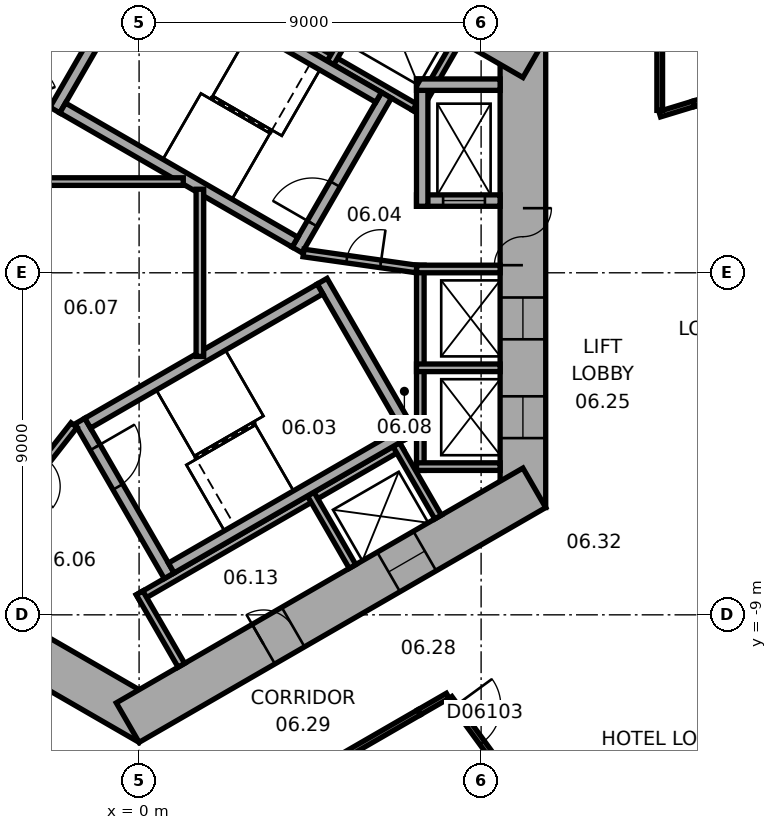
"""IFC4 building model, lengths in metres.
Left out: names, types, materials, properties, quantities, classifications, styles, units other than length and angle.
Written with IfcOpenShell. Run it as: python <this file> out.ifc"""

import sys

from ifc_helpers import new_model, si_unit, direction, frame, frame_2d, origin, place, context, subcontext, project, spatial, rectangle, extrude, element, fill, save


model = new_model("IFC4")
c1 = context("Model", 3, precision=1e-05, world=origin(), true_north=direction((0.0, 1.0)))
c2 = subcontext(c1, "Body", "Model", "MODEL_VIEW")
j1 = project(units=[si_unit("LENGTHUNIT", "METRE"), si_unit("PLANEANGLEUNIT", "RADIAN")], contexts=[c1])
p1 = place(None, origin())
s1 = spatial("IfcSite", under=j1, at=p1, CompositionType="ELEMENT")
p2 = place(p1, origin())
s2 = spatial("IfcBuilding", under=s1, at=p2, CompositionType="ELEMENT")
p3 = place(p2, frame((0.0, 0.0, 39.0)))
s3 = spatial("IfcBuildingStorey", under=s2, at=p3, CompositionType="ELEMENT", Elevation=39.0)
p4 = place(p3, frame((10.1, -6.177, 0.0), z_axis=(0.0, 0.0, 1.0), x_axis=(0.0, 1.0, 0.0)))
e1 = element("IfcWall", 1, at=p4, inside=s3, PredefinedType="SHEAR", context=c2, shape_type="SweptSolid", body=[
    extrude(rectangle(XDim=12.355, YDim=1.2, at=frame_2d((6.177, 0.0))), origin(), (0.0, 0.0, 1.0), 5.0),
])
p5 = place(p4, frame((6.378, 0.0, 0.0)))
e2 = element("IfcOpeningElement", 2, at=p5, cuts=e1, PredefinedType="OPENING", context=c2, shape_type="SweptSolid", body=[
    extrude(rectangle(XDim=1.5, YDim=2.1, at=frame_2d((0.75, 1.05))), frame((0.0, 0.61, 0.0), z_axis=(0.0, -1.0, 0.0), x_axis=(1.0, 0.0, 0.0)), (0.0, 0.0, 1.0), 1.22),
])
p6 = place(p4, frame((1.828, 0.0, 0.0)))
e3 = element("IfcOpeningElement", 3, at=p6, cuts=e1, PredefinedType="OPENING", context=c2, shape_type="SweptSolid", body=[
    extrude(rectangle(XDim=1.1, YDim=2.1, at=frame_2d((0.55, 1.05))), frame((0.0, 0.61, 0.0), z_axis=(0.0, -1.0, 0.0), x_axis=(1.0, 0.0, 0.0)), (0.0, 0.0, 1.0), 1.22),
])
p7 = place(p4, frame((4.427, 0.0, 0.0)))
e4 = element("IfcOpeningElement", 4, at=p7, cuts=e1, PredefinedType="OPENING", context=c2, shape_type="SweptSolid", body=[
    extrude(rectangle(XDim=1.1, YDim=2.1, at=frame_2d((0.55, 1.05))), frame((0.0, 0.61, 0.0), z_axis=(0.0, -1.0, 0.0), x_axis=(1.0, 0.0, 0.0)), (0.0, 0.0, 1.0), 1.22),
])
p8 = place(p3, frame((10.4, 5.658, 0.0), z_axis=(0.0, 0.0, 1.0), x_axis=(-0.866021384402, 0.500006961711, 0.0)))
e5 = element("IfcWall", 5, at=p8, inside=s3, PredefinedType="SHEAR", context=c2, shape_type="SweptSolid", body=[
    extrude(rectangle(XDim=12.355, YDim=1.2, at=frame_2d((6.178, 0.0))), origin(), (0.0, 0.0, 1.0), 5.0),
])
p9 = place(p8, frame((2.728, 0.0, 0.0)))
e6 = element("IfcOpeningElement", 6, at=p9, cuts=e5, PredefinedType="OPENING", context=c2, shape_type="SweptSolid", body=[
    extrude(rectangle(XDim=1.1, YDim=2.1, at=frame_2d((0.55, 1.05))), frame((0.0, 0.61, 0.0), z_axis=(0.0, -1.0, 0.0), x_axis=(1.0, 0.0, 0.0)), (0.0, 0.0, 1.0), 1.22),
])
p10 = place(p8, frame((5.328, 0.0, 0.0)))
e7 = element("IfcOpeningElement", 7, at=p10, cuts=e5, PredefinedType="OPENING", context=c2, shape_type="SweptSolid", body=[
    extrude(rectangle(XDim=1.1, YDim=2.1, at=frame_2d((0.55, 1.05))), frame((0.0, 0.61, 0.0), z_axis=(0.0, -1.0, 0.0), x_axis=(1.0, 0.0, 0.0)), (0.0, 0.0, 1.0), 1.22),
])
p11 = place(p8, frame((7.928, 0.0, 0.0)))
e8 = element("IfcOpeningElement", 8, at=p11, cuts=e5, PredefinedType="OPENING", context=c2, shape_type="SweptSolid", body=[
    extrude(rectangle(XDim=1.1, YDim=2.1, at=frame_2d((0.55, 1.05))), frame((0.0, 0.61, 0.0), z_axis=(0.0, -1.0, 0.0), x_axis=(1.0, 0.0, 0.0)), (0.0, 0.0, 1.0), 1.22),
])
p12 = place(p3, frame((0.3, 11.836, 0.0), z_axis=(0.0, 0.0, 1.0), x_axis=(-0.866021384402, -0.500006961711, 0.0)))
e9 = element("IfcWall", 9, at=p12, inside=s3, PredefinedType="SHEAR", context=c2, shape_type="SweptSolid", body=[
    extrude(rectangle(XDim=12.355, YDim=1.2, at=frame_2d((6.178, 0.0))), origin(), (0.0, 0.0, 1.0), 5.0),
])
p13 = place(p12, frame((6.378, 0.0, 0.0)))
e10 = element("IfcOpeningElement", 10, at=p13, cuts=e9, PredefinedType="OPENING", context=c2, shape_type="SweptSolid", body=[
    extrude(rectangle(XDim=1.5, YDim=2.1, at=frame_2d((0.75, 1.05))), frame((0.0, 0.61, 0.0), z_axis=(0.0, -1.0, 0.0), x_axis=(1.0, 0.0, 0.0)), (0.0, 0.0, 1.0), 1.22),
])
p14 = place(p12, frame((1.828, 0.0, 0.0)))
e11 = element("IfcOpeningElement", 11, at=p14, cuts=e9, PredefinedType="OPENING", context=c2, shape_type="SweptSolid", body=[
    extrude(rectangle(XDim=1.1, YDim=2.1, at=frame_2d((0.55, 1.05))), frame((0.0, 0.61, 0.0), z_axis=(0.0, -1.0, 0.0), x_axis=(1.0, 0.0, 0.0)), (0.0, 0.0, 1.0), 1.22),
])
p15 = place(p3, frame((-10.4, -5.658, 0.0), z_axis=(0.0, 0.0, 1.0), x_axis=(0.866021384402, -0.500006961711, 0.0)))
e12 = element("IfcWall", 12, at=p15, inside=s3, PredefinedType="SHEAR", context=c2, shape_type="SweptSolid", body=[
    extrude(rectangle(XDim=12.355, YDim=1.2, at=frame_2d((6.178, 0.0))), origin(), (0.0, 0.0, 1.0), 5.0),
])
p16 = place(p15, frame((6.378, 0.0, 0.0)))
e13 = element("IfcOpeningElement", 13, at=p16, cuts=e12, PredefinedType="OPENING", context=c2, shape_type="SweptSolid", body=[
    extrude(rectangle(XDim=1.5, YDim=2.1, at=frame_2d((0.75, 1.05))), frame((0.0, 0.61, 0.0), z_axis=(0.0, -1.0, 0.0), x_axis=(1.0, 0.0, 0.0)), (0.0, 0.0, 1.0), 1.22),
])
p17 = place(p15, frame((3.228, 0.0, 0.0)))
e14 = element("IfcOpeningElement", 14, at=p17, cuts=e12, PredefinedType="OPENING", context=c2, shape_type="SweptSolid", body=[
    extrude(rectangle(XDim=0.9, YDim=2.1, at=frame_2d((0.45, 1.05))), frame((0.0, 0.61, 0.0), z_axis=(0.0, -1.0, 0.0), x_axis=(1.0, 0.0, 0.0)), (0.0, 0.0, 1.0), 1.22),
])
p18 = place(p3, frame((-0.3, -11.836, 0.0), z_axis=(0.0, 0.0, 1.0), x_axis=(0.866021384402, 0.500006961711, 0.0)))
e15 = element("IfcWall", 15, at=p18, inside=s3, PredefinedType="SHEAR", context=c2, shape_type="SweptSolid", body=[
    extrude(rectangle(XDim=12.355, YDim=1.2, at=frame_2d((6.178, 0.0))), origin(), (0.0, 0.0, 1.0), 5.0),
])
p19 = place(p18, frame((4.128, 0.0, 0.0)))
e16 = element("IfcOpeningElement", 16, at=p19, cuts=e15, PredefinedType="OPENING", context=c2, shape_type="SweptSolid", body=[
    extrude(rectangle(XDim=0.9, YDim=2.1, at=frame_2d((0.45, 1.05))), frame((0.0, 0.61, 0.0), z_axis=(0.0, -1.0, 0.0), x_axis=(1.0, 0.0, 0.0)), (0.0, 0.0, 1.0), 1.22),
])
p20 = place(p18, frame((7.928, 0.0, 0.0)))
e17 = element("IfcOpeningElement", 17, at=p20, cuts=e15, PredefinedType="OPENING", context=c2, shape_type="SweptSolid", body=[
    extrude(rectangle(XDim=1.1, YDim=2.1, at=frame_2d((0.55, 1.05))), frame((0.0, 0.61, 0.0), z_axis=(0.0, -1.0, 0.0), x_axis=(1.0, 0.0, 0.0)), (0.0, 0.0, 1.0), 1.22),
])
p21 = place(p3, frame((7.4, -5.2, 0.0), z_axis=(0.0, 0.0, 1.0), x_axis=(0.0, 1.0, 0.0)))
e18 = element("IfcWall", 18, at=p21, inside=s3, PredefinedType="PARTITIONING", context=c2, shape_type="SweptSolid", body=[
    extrude(rectangle(XDim=5.4, YDim=0.2, at=frame_2d((2.7, 0.0))), origin(), (0.0, 0.0, 1.0), 4.75),
])
for number, where, z_axis, x_axis in (
    (19, (7.3, -5.1, 0.0), (0.0, 0.0, 1.0), (1.0, 0.0, 0.0)),
    (20, (7.3, -2.5, 0.0), (0.0, 0.0, 1.0), (1.0, 0.0, 0.0)),
    (21, (7.3, 0.1, 0.0), (0.0, 0.0, 1.0), (1.0, 0.0, 0.0)),
):
    element("IfcWall", number, at=place(p3, frame(where, z_axis=z_axis, x_axis=x_axis)), inside=s3, PredefinedType="PARTITIONING", context=c2, shape_type="SweptSolid", body=[
        extrude(rectangle(XDim=2.2, YDim=0.2, at=frame_2d((1.1, 0.0))), origin(), (0.0, 0.0, 1.0), 4.75),
    ])
p22 = place(p3, frame((7.424, 4.259, 0.0), z_axis=(0.0, 0.0, 1.0), x_axis=(-0.866026010844, 0.49999894854, 0.0)))
e22 = element("IfcWall", 22, at=p22, inside=s3, PredefinedType="PARTITIONING", context=c2, shape_type="SweptSolid", body=[
    extrude(rectangle(XDim=8.0, YDim=0.2, at=frame_2d((4.0, 0.0))), origin(), (0.0, 0.0, 1.0), 4.75),
])
for number, where, z_axis, x_axis in (
    (23, (7.287, 4.222, 0.0), (0.0, 0.0, 1.0), (0.5, 0.866, 0.0)),
    (24, (5.036, 5.522, 0.0), (0.0, 0.0, 1.0), (0.5, 0.866, 0.0)),
):
    element("IfcWall", number, at=place(p3, frame(where, z_axis=z_axis, x_axis=x_axis)), inside=s3, PredefinedType="PARTITIONING", context=c2, shape_type="SweptSolid", body=[
        extrude(rectangle(XDim=2.2, YDim=0.2, at=frame_2d((1.1, 0.0))), origin(), (0.0, 0.0, 1.0), 4.75),
    ])
p23 = place(p3, frame((-0.024, -8.559, 0.0), z_axis=(0.0, 0.0, 1.0), x_axis=(0.866026010844, 0.49999894854, 0.0)))
e25 = element("IfcWall", 25, at=p23, inside=s3, PredefinedType="PARTITIONING", context=c2, shape_type="SweptSolid", body=[
    extrude(rectangle(XDim=8.0, YDim=0.2, at=frame_2d((4.0, 0.0))), origin(), (0.0, 0.0, 1.0), 4.75),
])
for number, where, z_axis, x_axis in (
    (26, (0.013, -8.422, 0.0), (0.0, 0.0, 1.0), (0.5, -0.866, 0.0)),
    (27, (4.516, -5.822, 0.0), (0.0, 0.0, 1.0), (0.5, -0.866, 0.0)),
    (28, (6.768, -4.522, 0.0), (0.0, 0.0, 1.0), (0.5, -0.866, 0.0)),
):
    element("IfcWall", number, at=place(p3, frame(where, z_axis=z_axis, x_axis=x_axis)), inside=s3, PredefinedType="PARTITIONING", context=c2, shape_type="SweptSolid", body=[
        extrude(rectangle(XDim=2.2, YDim=0.2, at=frame_2d((1.1, 0.0))), origin(), (0.0, 0.0, 1.0), 4.75),
    ])
p24 = place(p3, frame((4.158, 0.602, 0.0), z_axis=(0.0, 0.0, 1.0), x_axis=(0.499977259774, 0.866038532462, 0.0)))
e29 = element("IfcWall", 29, at=p24, inside=s3, PredefinedType="SHEAR", context=c2, shape_type="SweptSolid", body=[
    extrude(rectangle(XDim=4.7, YDim=0.3, at=frame_2d((2.35, 0.0))), origin(), (0.0, 0.0, 1.0), 4.75),
])
p25 = place(p24, frame((0.8, 0.0, 0.0)))
e30 = element("IfcOpeningElement", 30, at=p25, cuts=e29, PredefinedType="OPENING", context=c2, shape_type="SweptSolid", body=[
    extrude(rectangle(XDim=1.2, YDim=2.1, at=frame_2d((0.6, 1.05))), frame((0.0, 0.16, 0.0), z_axis=(0.0, -1.0, 0.0), x_axis=(1.0, 0.0, 0.0)), (0.0, 0.0, 1.0), 0.32),
])
p26 = place(p3, frame((-2.216, 4.282, 0.0), z_axis=(0.0, 0.0, 1.0), x_axis=(0.499977259774, 0.866038532462, 0.0)))
e31 = element("IfcWall", 31, at=p26, inside=s3, PredefinedType="SHEAR", context=c2, shape_type="SweptSolid", body=[
    extrude(rectangle(XDim=4.7, YDim=0.3, at=frame_2d((2.35, 0.0))), origin(), (0.0, 0.0, 1.0), 4.75),
])
for number, where, z_axis, x_axis in (
    (32, (4.103, 0.807, 0.0), (0.0, 0.0, 1.0), (-0.866, 0.5, 0.0)),
    (33, (6.303, 4.617, 0.0), (0.0, 0.0, 1.0), (-0.866, 0.5, 0.0)),
):
    element("IfcWall", number, at=place(p3, frame(where, z_axis=z_axis, x_axis=x_axis)), inside=s3, PredefinedType="SHEAR", context=c2, shape_type="SweptSolid", body=[
        extrude(rectangle(XDim=7.06, YDim=0.3, at=frame_2d((3.53, 0.0))), origin(), (0.0, 0.0, 1.0), 4.75),
    ])
p27 = place(p3, frame((-1.558, -3.902, 0.0), z_axis=(0.0, 0.0, 1.0), x_axis=(0.499977259774, -0.866038532462, 0.0)))
e34 = element("IfcWall", 34, at=p27, inside=s3, PredefinedType="SHEAR", context=c2, shape_type="SweptSolid", body=[
    extrude(rectangle(XDim=4.7, YDim=0.3, at=frame_2d((2.35, 0.0))), origin(), (0.0, 0.0, 1.0), 4.75),
])
p28 = place(p27, frame((0.8, 0.0, 0.0)))
e35 = element("IfcOpeningElement", 35, at=p28, cuts=e34, PredefinedType="OPENING", context=c2, shape_type="SweptSolid", body=[
    extrude(rectangle(XDim=1.2, YDim=2.1, at=frame_2d((0.6, 1.05))), frame((0.0, 0.16, 0.0), z_axis=(0.0, -1.0, 0.0), x_axis=(1.0, 0.0, 0.0)), (0.0, 0.0, 1.0), 0.32),
])
p29 = place(p3, frame((4.816, -0.222, 0.0), z_axis=(0.0, 0.0, 1.0), x_axis=(0.499977259774, -0.866038532462, 0.0)))
e36 = element("IfcWall", 36, at=p29, inside=s3, PredefinedType="SHEAR", context=c2, shape_type="SweptSolid", body=[
    extrude(rectangle(XDim=4.7, YDim=0.3, at=frame_2d((2.35, 0.0))), origin(), (0.0, 0.0, 1.0), 4.75),
])
for number, where, z_axis, x_axis in (
    (37, (-1.353, -3.957, 0.0), (0.0, 0.0, 1.0), (0.866, 0.5, 0.0)),
    (38, (0.847, -7.767, 0.0), (0.0, 0.0, 1.0), (0.866, 0.5, 0.0)),
):
    element("IfcWall", number, at=place(p3, frame(where, z_axis=z_axis, x_axis=x_axis)), inside=s3, PredefinedType="SHEAR", context=c2, shape_type="SweptSolid", body=[
        extrude(rectangle(XDim=7.06, YDim=0.3, at=frame_2d((3.53, 0.0))), origin(), (0.0, 0.0, 1.0), 4.75),
    ])
p30 = place(p3, frame((7.3, 1.9, 0.0), z_axis=(0.0, 0.0, 1.0), x_axis=(1.0, 0.0, 0.0)))
e39 = element("IfcWall", 39, at=p30, inside=s3, PredefinedType="SHEAR", context=c2, shape_type="SweptSolid", body=[
    extrude(rectangle(XDim=2.2, YDim=0.3, at=frame_2d((1.1, 0.0))), origin(), (0.0, 0.0, 1.0), 4.75),
])
p31 = place(p30, frame((0.7, 0.0, 0.0)))
e40 = element("IfcOpeningElement", 40, at=p31, cuts=e39, PredefinedType="OPENING", context=c2, shape_type="SweptSolid", body=[
    extrude(rectangle(XDim=1.1, YDim=2.1, at=frame_2d((0.55, 1.05))), frame((0.0, 0.16, 0.0), z_axis=(0.0, -1.0, 0.0), x_axis=(1.0, 0.0, 0.0)), (0.0, 0.0, 1.0), 0.32),
])
p32 = place(p3, frame((7.45, 1.75, 0.0), z_axis=(0.0, 0.0, 1.0), x_axis=(0.0, 1.0, 0.0)))
e41 = element("IfcWall", 41, at=p32, inside=s3, PredefinedType="SHEAR", context=c2, shape_type="SweptSolid", body=[
    extrude(rectangle(XDim=3.35, YDim=0.3, at=frame_2d((1.675, 0.0))), origin(), (0.0, 0.0, 1.0), 4.75),
])
p33 = place(p3, frame((7.3, 4.95, 0.0), z_axis=(0.0, 0.0, 1.0), x_axis=(1.0, 0.0, 0.0)))
e42 = element("IfcWall", 42, at=p33, inside=s3, PredefinedType="SHEAR", context=c2, shape_type="SweptSolid", body=[
    extrude(rectangle(XDim=2.2, YDim=0.3, at=frame_2d((1.1, 0.0))), origin(), (0.0, 0.0, 1.0), 4.75),
])
p34 = place(p3, frame((4.327, 0.521, 0.0), z_axis=(0.0, 0.0, 1.0), x_axis=(0.990124376366, -0.14019172346, 0.0)))
e43 = element("IfcWall", 43, at=p34, inside=s3, PredefinedType="PARTITIONING", context=c2, shape_type="SweptSolid", body=[
    extrude(rectangle(XDim=3.002, YDim=0.2, at=frame_2d((1.501, 0.0))), origin(), (0.0, 0.0, 1.0), 4.75),
])
p35 = place(p34, frame((1.15, 0.0, 0.0)))
e44 = element("IfcOpeningElement", 44, at=p35, cuts=e43, PredefinedType="OPENING", context=c2, shape_type="SweptSolid", body=[
    extrude(rectangle(XDim=0.9, YDim=2.1, at=frame_2d((0.45, 1.05))), frame((0.0, 0.11, 0.0), z_axis=(0.0, -1.0, 0.0), x_axis=(1.0, 0.0, 0.0)), (0.0, 0.0, 1.0), 0.22),
])
p36 = place(p3, frame((-1.712, -4.008, 0.0), z_axis=(0.0, 0.0, 1.0), x_axis=(-0.616549420702, -0.787316208287, 0.0)))
e45 = element("IfcWall", 45, at=p36, inside=s3, PredefinedType="PARTITIONING", context=c2, shape_type="SweptSolid", body=[
    extrude(rectangle(XDim=3.002, YDim=0.2, at=frame_2d((1.501, 0.0))), origin(), (0.0, 0.0, 1.0), 4.75),
])
p37 = place(p36, frame((1.15, 0.0, 0.0)))
e46 = element("IfcOpeningElement", 46, at=p37, cuts=e45, PredefinedType="OPENING", context=c2, shape_type="SweptSolid", body=[
    extrude(rectangle(XDim=0.9, YDim=2.1, at=frame_2d((0.45, 1.05))), frame((0.0, 0.11, 0.0), z_axis=(0.0, -1.0, 0.0), x_axis=(1.0, 0.0, 0.0)), (0.0, 0.0, 1.0), 0.22),
])
p38 = place(p3, frame((-2.72, 2.4, 0.0), z_axis=(0.0, 0.0, 1.0), x_axis=(1.0, 0.0, 0.0)))
e47 = element("IfcWall", 47, at=p38, inside=s3, PredefinedType="PARTITIONING", context=c2, shape_type="SweptSolid", body=[
    extrude(rectangle(XDim=3.883, YDim=0.2, at=frame_2d((1.941, 0.0))), origin(), (0.0, 0.0, 1.0), 4.75),
])
p39 = place(p3, frame((1.6, -2.198, 0.0), z_axis=(0.0, 0.0, 1.0), x_axis=(0.0, 1.0, 0.0)))
e48 = element("IfcWall", 48, at=p39, inside=s3, PredefinedType="PARTITIONING", context=c2, shape_type="SweptSolid", body=[
    extrude(rectangle(XDim=4.397, YDim=0.2, at=frame_2d((2.198, 0.0))), origin(), (0.0, 0.0, 1.0), 4.75),
])
p40 = place(p3, frame((7.369, -11.564, 0.0), z_axis=(0.0, 0.0, 1.0), x_axis=(-0.86600466253, -0.500035923186, 0.0)))
e49 = element("IfcWall", 49, at=p40, inside=s3, PredefinedType="PARTITIONING", context=c2, shape_type="SweptSolid", body=[
    extrude(rectangle(XDim=8.45, YDim=0.15, at=frame_2d((4.225, 0.0))), origin(), (0.0, 0.0, 1.0), 4.75),
])
p41 = place(p3, frame((7.369, -11.564, 0.0), z_axis=(0.0, 0.0, 1.0), x_axis=(0.865956808668, 0.50011879141, 0.0)))
e50 = element("IfcWall", 50, at=p41, inside=s3, PredefinedType="PARTITIONING", context=c2, shape_type="SweptSolid", body=[
    extrude(rectangle(XDim=0.871, YDim=0.15, at=frame_2d((0.436, 0.0))), origin(), (0.0, 0.0, 1.0), 4.75),
])
p42 = place(p3, frame((8.171, -11.194, 0.0), z_axis=(0.0, 0.0, 1.0), x_axis=(0.589561466491, -0.807723515337, 0.0)))
e51 = element("IfcWall", 51, at=p42, inside=s3, PredefinedType="PARTITIONING", context=c2, shape_type="SweptSolid", body=[
    extrude(rectangle(XDim=4.52, YDim=0.15, at=frame_2d((2.26, 0.0))), origin(), (0.0, 0.0, 1.0), 4.75),
])
p43 = place(p42, frame((0.25, 0.0, 0.0)))
e52 = element("IfcOpeningElement", 52, at=p43, cuts=e51, PredefinedType="OPENING", context=c2, shape_type="SweptSolid", body=[
    extrude(rectangle(XDim=1.2, YDim=2.1, at=frame_2d((0.6, 1.05))), frame((0.0, 0.085, 0.0), z_axis=(0.0, -1.0, 0.0), x_axis=(1.0, 0.0, 0.0)), (0.0, 0.0, 1.0), 0.17),
])
p44 = place(p3, frame((14.593, 4.446, 0.0), z_axis=(0.0, 0.0, 1.0), x_axis=(-0.956578767646, -0.291473946159, 0.0)))
e53 = element("IfcWall", 53, at=p44, inside=s3, PredefinedType="PARTITIONING", context=c2, shape_type="SweptSolid", body=[
    extrude(rectangle(XDim=0.933, YDim=0.15, at=frame_2d((0.467, 0.0))), origin(), (0.0, 0.0, 1.0), 4.3),
])
p45 = place(p3, frame((14.593, 4.446, 0.0), z_axis=(0.0, 0.0, 1.0), x_axis=(0.956592729621, 0.291428120874, 0.0)))
e54 = element("IfcWall", 54, at=p45, inside=s3, PredefinedType="PARTITIONING", context=c2, shape_type="SweptSolid", body=[
    extrude(rectangle(XDim=7.691, YDim=0.15, at=frame_2d((3.846, 0.0))), origin(), (0.0, 0.0, 1.0), 4.3),
])
p46 = place(p45, frame((5.991, 0.0, 0.0)))
e55 = element("IfcOpeningElement", 55, at=p46, cuts=e54, PredefinedType="OPENING", context=c2, shape_type="SweptSolid", body=[
    extrude(rectangle(XDim=1.4, YDim=2.4, at=frame_2d((0.7, 1.2))), frame((0.0, 0.085, 0.0), z_axis=(0.0, -1.0, 0.0), x_axis=(1.0, 0.0, 0.0)), (0.0, 0.0, 1.0), 0.17),
])
p47 = place(p3, frame((13.7, 7.85, 0.0), z_axis=(0.0, 0.0, 1.0), x_axis=(0.0, -1.0, 0.0)))
e56 = element("IfcWall", 56, at=p47, inside=s3, PredefinedType="PARTITIONING", context=c2, shape_type="SweptSolid", body=[
    extrude(rectangle(XDim=3.576, YDim=0.15, at=frame_2d((1.788, 0.0))), origin(), (0.0, 0.0, 1.0), 4.75),
])
p48 = place(p5, origin())
e57 = element("IfcDoor", 57, at=p48, inside=s3, OperationType="DOUBLE_DOOR_SINGLE_SWING", PredefinedType="DOOR", context=c2, shape_type="SweptSolid", body=[
    extrude(rectangle(XDim=1.5, YDim=2.1, at=frame_2d((0.75, 1.05))), frame((0.0, 0.025, 0.0), z_axis=(0.0, -1.0, 0.0), x_axis=(1.0, 0.0, 0.0)), (0.0, 0.0, 1.0), 0.05),
])
fill(e2, e57)
p49 = place(p25, origin())
e58 = element("IfcDoor", 58, at=p49, inside=s3, OperationType="SINGLE_SWING_RIGHT", PredefinedType="DOOR", context=c2, shape_type="SweptSolid", body=[
    extrude(rectangle(XDim=1.2, YDim=2.1, at=frame_2d((0.6, 1.05))), frame((0.0, 0.025, 0.0), z_axis=(0.0, -1.0, 0.0), x_axis=(1.0, 0.0, 0.0)), (0.0, 0.0, 1.0), 0.05),
])
fill(e30, e58)
p50 = place(p28, origin())
e59 = element("IfcDoor", 59, at=p50, inside=s3, OperationType="SINGLE_SWING_RIGHT", PredefinedType="DOOR", context=c2, shape_type="SweptSolid", body=[
    extrude(rectangle(XDim=1.2, YDim=2.1, at=frame_2d((0.6, 1.05))), frame((0.0, 0.025, 0.0), z_axis=(0.0, -1.0, 0.0), x_axis=(1.0, 0.0, 0.0)), (0.0, 0.0, 1.0), 0.05),
])
fill(e35, e59)
p51 = place(p35, origin())
e60 = element("IfcDoor", 60, at=p51, inside=s3, OperationType="SINGLE_SWING_LEFT", PredefinedType="DOOR", context=c2, shape_type="SweptSolid", body=[
    extrude(rectangle(XDim=0.9, YDim=2.1, at=frame_2d((0.45, 1.05))), frame((0.0, 0.025, 0.0), z_axis=(0.0, -1.0, 0.0), x_axis=(1.0, 0.0, 0.0)), (0.0, 0.0, 1.0), 0.05),
])
fill(e44, e60)
p52 = place(p19, origin())
e61 = element("IfcDoor", 61, at=p52, inside=s3, OperationType="SINGLE_SWING_LEFT", PredefinedType="DOOR", context=c2, shape_type="SweptSolid", body=[
    extrude(rectangle(XDim=0.9, YDim=2.1, at=frame_2d((0.45, 1.05))), frame((0.0, 0.025, 0.0), z_axis=(0.0, -1.0, 0.0), x_axis=(1.0, 0.0, 0.0)), (0.0, 0.0, 1.0), 0.05),
])
fill(e16, e61)
p53 = place(p31, origin())
e62 = element("IfcDoor", 62, at=p53, inside=s3, OperationType="DOUBLE_DOOR_SLIDING", PredefinedType="DOOR", context=c2, shape_type="SweptSolid", body=[
    extrude(rectangle(XDim=1.1, YDim=2.1, at=frame_2d((0.55, 1.05))), frame((0.0, 0.025, 0.0), z_axis=(0.0, -1.0, 0.0), x_axis=(1.0, 0.0, 0.0)), (0.0, 0.0, 1.0), 0.05),
])
fill(e40, e62)
p54 = place(p6, origin())
e63 = element("IfcDoor", 63, at=p54, inside=s3, OperationType="DOUBLE_DOOR_SLIDING", PredefinedType="DOOR", context=c2, shape_type="SweptSolid", body=[
    extrude(rectangle(XDim=1.1, YDim=2.1, at=frame_2d((0.55, 1.05))), frame((0.0, 0.025, 0.0), z_axis=(0.0, -1.0, 0.0), x_axis=(1.0, 0.0, 0.0)), (0.0, 0.0, 1.0), 0.05),
])
fill(e3, e63)
p55 = place(p7, origin())
e64 = element("IfcDoor", 64, at=p55, inside=s3, OperationType="DOUBLE_DOOR_SLIDING", PredefinedType="DOOR", context=c2, shape_type="SweptSolid", body=[
    extrude(rectangle(XDim=1.1, YDim=2.1, at=frame_2d((0.55, 1.05))), frame((0.0, 0.025, 0.0), z_axis=(0.0, -1.0, 0.0), x_axis=(1.0, 0.0, 0.0)), (0.0, 0.0, 1.0), 0.05),
])
fill(e4, e64)
p56 = place(p20, origin())
e65 = element("IfcDoor", 65, at=p56, inside=s3, OperationType="DOUBLE_DOOR_SLIDING", PredefinedType="DOOR", context=c2, shape_type="SweptSolid", body=[
    extrude(rectangle(XDim=1.1, YDim=2.1, at=frame_2d((0.55, 1.05))), frame((0.0, 0.025, 0.0), z_axis=(0.0, -1.0, 0.0), x_axis=(1.0, 0.0, 0.0)), (0.0, 0.0, 1.0), 0.05),
])
fill(e17, e65)
p57 = place(p43, origin())
e66 = element("IfcDoor", 66, at=p57, inside=s3, OperationType="SINGLE_SWING_LEFT", PredefinedType="DOOR", context=c2, shape_type="SweptSolid", body=[
    extrude(rectangle(XDim=1.2, YDim=2.1, at=frame_2d((0.6, 1.05))), frame((0.0, 0.025, 0.0), z_axis=(0.0, -1.0, 0.0), x_axis=(1.0, 0.0, 0.0)), (0.0, 0.0, 1.0), 0.05),
])
fill(e52, e66)
save(model, sys.argv[1])
